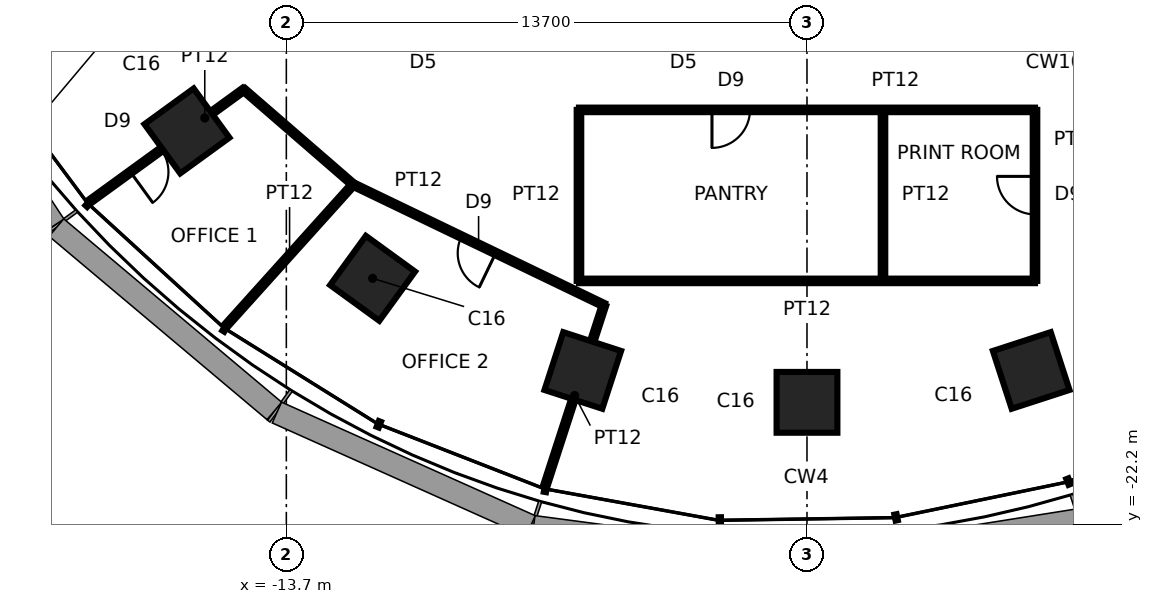
"""IFC4 building model, lengths in metres.
Left out: names, types, materials, properties, quantities, classifications, styles, units other than length and angle.
Written with IfcOpenShell. Run it as: python <this file> out.ifc"""

import sys

from ifc_helpers import new_model, si_unit, direction, frame, frame_2d, origin, origin_2d, place, context, subcontext, project, spatial, rectangle, extrude, element, fill, save


model = new_model("IFC4")
c1 = context("Model", 3, precision=1e-05, world=origin(), true_north=direction((0.0, 1.0)))
c2 = subcontext(c1, "Body", "Model", "MODEL_VIEW")
j1 = project(units=[si_unit("LENGTHUNIT", "METRE"), si_unit("PLANEANGLEUNIT", "RADIAN")], contexts=[c1])
p1 = place(None, origin())
s1 = spatial("IfcSite", under=j1, at=p1, CompositionType="ELEMENT")
p2 = place(p1, origin())
s2 = spatial("IfcBuilding", under=s1, at=p2, CompositionType="ELEMENT")
p3 = place(p2, frame((0.0, 0.0, 154.8)))
s3 = spatial("IfcBuildingStorey", under=s2, at=p3, CompositionType="ELEMENT", Elevation=154.8)
for number, where, z_axis, x_axis in (
    (1, (-16.315, -11.854, 0.0), (0.0, 0.0, 1.0), (-0.809, -0.588, 0.0)),
    (2, (-11.43, -15.733, 0.0), (0.0, 0.0, 1.0), (-0.588, -0.809, 0.0)),
    (3, (-5.9, -18.157, 0.0), (0.0, 0.0, 1.0), (-0.309, -0.951, 0.0)),
    (4, (0.0, -18.996, 0.0), (0.0, 0.0, 1.0), (0.0, -1.0, 0.0)),
    (5, (5.9, -18.157, 0.0), (0.0, 0.0, 1.0), (0.309, -0.951, 0.0)),
):
    element("IfcColumn", number, at=place(p3, frame(where, z_axis=z_axis, x_axis=x_axis)), inside=s3, PredefinedType="COLUMN", context=c2, shape_type="SweptSolid", body=[
        extrude(rectangle(XDim=1.6, YDim=1.6, at=origin_2d()), origin(), (0.0, 0.0, 1.0), 3.9),
    ])
p4 = place(p3, frame((-14.821, -10.768, 0.0), z_axis=(0.0, 0.0, 1.0), x_axis=(-0.809042143657, -0.587750635718, 0.0)))
e6 = element("IfcWall", 6, at=p4, inside=s3, PredefinedType="PARTITIONING", context=c2, shape_type="SweptSolid", body=[
    extrude(rectangle(XDim=5.0, YDim=0.12, at=frame_2d((2.5, 0.0))), origin(), (0.0, 0.0, 1.0), 2.94),
])
p5 = place(p4, frame((2.685, 0.0, 0.0)))
e7 = element("IfcOpeningElement", 7, at=p5, cuts=e6, PredefinedType="OPENING", context=c2, shape_type="SweptSolid", body=[
    extrude(rectangle(XDim=1.0, YDim=2.4, at=frame_2d((0.5, 1.2))), frame((0.0, 0.07, 0.0), z_axis=(0.0, -1.0, 0.0), x_axis=(1.0, 0.0, 0.0)), (0.0, 0.0, 1.0), 0.14),
])
p6 = place(p3, frame((-11.942, -13.263, 0.0), z_axis=(0.0, 0.0, 1.0), x_axis=(-0.755744060509, 0.654867097208, 0.0)))
e8 = element("IfcWall", 8, at=p6, inside=s3, PredefinedType="PARTITIONING", context=c2, shape_type="SweptSolid", body=[
    extrude(rectangle(XDim=3.809, YDim=0.12, at=frame_2d((1.905, 0.0))), origin(), (0.0, 0.0, 1.0), 3.74),
])
p7 = place(p3, frame((-11.942, -13.263, 0.0), z_axis=(0.0, 0.0, 1.0), x_axis=(-0.669126573551, -0.743148456614, 0.0)))
e9 = element("IfcWall", 9, at=p7, inside=s3, PredefinedType="PARTITIONING", context=c2, shape_type="SweptSolid", body=[
    extrude(rectangle(XDim=5.0, YDim=0.12, at=frame_2d((2.5, 0.0))), origin(), (0.0, 0.0, 1.0), 3.74),
])
p8 = place(p3, frame((-5.341, -16.439, 0.0), z_axis=(0.0, 0.0, 1.0), x_axis=(-0.901084159561, 0.43364425211, 0.0)))
e10 = element("IfcWall", 10, at=p8, inside=s3, PredefinedType="PARTITIONING", context=c2, shape_type="SweptSolid", body=[
    extrude(rectangle(XDim=7.325, YDim=0.12, at=frame_2d((3.663, 0.0))), origin(), (0.0, 0.0, 1.0), 3.74),
])
p9 = place(p8, frame((3.162, 0.0, 0.0)))
e11 = element("IfcOpeningElement", 11, at=p9, cuts=e10, PredefinedType="OPENING", context=c2, shape_type="SweptSolid", body=[
    extrude(rectangle(XDim=1.0, YDim=2.4, at=frame_2d((0.5, 1.2))), frame((0.0, 0.07, 0.0), z_axis=(0.0, -1.0, 0.0), x_axis=(1.0, 0.0, 0.0)), (0.0, 0.0, 1.0), 0.14),
])
p10 = place(p3, frame((-6.0, -15.8, 0.0), z_axis=(0.0, 0.0, 1.0), x_axis=(0.0, 1.0, 0.0)))
e12 = element("IfcWall", 12, at=p10, inside=s3, PredefinedType="PARTITIONING", context=c2, shape_type="SweptSolid", body=[
    extrude(rectangle(XDim=4.5, YDim=0.12, at=frame_2d((2.25, 0.0))), origin(), (0.0, 0.0, 1.0), 3.74),
])
p11 = place(p3, frame((-6.886, -21.194, 0.0), z_axis=(0.0, 0.0, 1.0), x_axis=(0.309040803421, 0.951048779938, 0.0)))
e13 = element("IfcWall", 13, at=p11, inside=s3, PredefinedType="PARTITIONING", context=c2, shape_type="SweptSolid", body=[
    extrude(rectangle(XDim=5.0, YDim=0.12, at=frame_2d((2.5, 0.0))), origin(), (0.0, 0.0, 1.0), 2.94),
])
p12 = place(p3, frame((-6.0, -11.3, 0.0), z_axis=(0.0, 0.0, 1.0), x_axis=(1.0, 0.0, 0.0)))
e14 = element("IfcWall", 14, at=p12, inside=s3, PredefinedType="PARTITIONING", context=c2, shape_type="SweptSolid", body=[
    extrude(rectangle(XDim=12.0, YDim=0.12, at=frame_2d((6.0, 0.0))), origin(), (0.0, 0.0, 1.0), 3.74),
])
p13 = place(p12, frame((3.5, 0.0, 0.0)))
e15 = element("IfcOpeningElement", 15, at=p13, cuts=e14, PredefinedType="OPENING", context=c2, shape_type="SweptSolid", body=[
    extrude(rectangle(XDim=1.0, YDim=2.4, at=frame_2d((0.5, 1.2))), frame((0.0, 0.07, 0.0), z_axis=(0.0, -1.0, 0.0), x_axis=(1.0, 0.0, 0.0)), (0.0, 0.0, 1.0), 0.14),
])
p14 = place(p3, frame((6.0, -15.8, 0.0), z_axis=(0.0, 0.0, 1.0), x_axis=(-1.0, 0.0, 0.0)))
e16 = element("IfcWall", 16, at=p14, inside=s3, PredefinedType="PARTITIONING", context=c2, shape_type="SweptSolid", body=[
    extrude(rectangle(XDim=12.0, YDim=0.12, at=frame_2d((6.0, 0.0))), origin(), (0.0, 0.0, 1.0), 3.286),
])
p15 = place(p3, frame((2.0, -11.3, 0.0), z_axis=(0.0, 0.0, 1.0), x_axis=(0.0, -1.0, 0.0)))
e17 = element("IfcWall", 17, at=p15, inside=s3, PredefinedType="PARTITIONING", context=c2, shape_type="SweptSolid", body=[
    extrude(rectangle(XDim=4.5, YDim=0.12, at=frame_2d((2.25, 0.0))), origin(), (0.0, 0.0, 1.0), 3.74),
])
p16 = place(p3, frame((6.0, -11.3, 0.0), z_axis=(0.0, 0.0, 1.0), x_axis=(0.0, -1.0, 0.0)))
e18 = element("IfcWall", 18, at=p16, inside=s3, PredefinedType="PARTITIONING", context=c2, shape_type="SweptSolid", body=[
    extrude(rectangle(XDim=4.5, YDim=0.12, at=frame_2d((2.25, 0.0))), origin(), (0.0, 0.0, 1.0), 3.74),
])
p17 = place(p16, frame((1.75, 0.0, 0.0)))
e19 = element("IfcOpeningElement", 19, at=p17, cuts=e18, PredefinedType="OPENING", context=c2, shape_type="SweptSolid", body=[
    extrude(rectangle(XDim=1.0, YDim=2.4, at=frame_2d((0.5, 1.2))), frame((0.0, 0.07, 0.0), z_axis=(0.0, -1.0, 0.0), x_axis=(1.0, 0.0, 0.0)), (0.0, 0.0, 1.0), 0.14),
])
p18 = place(p5, origin())
e20 = element("IfcDoor", 20, at=p18, inside=s3, OperationType="SINGLE_SWING_RIGHT", PredefinedType="DOOR", context=c2, shape_type="SweptSolid", body=[
    extrude(rectangle(XDim=1.0, YDim=2.4, at=frame_2d((0.5, 1.2))), frame((0.0, 0.025, 0.0), z_axis=(0.0, -1.0, 0.0), x_axis=(1.0, 0.0, 0.0)), (0.0, 0.0, 1.0), 0.05),
])
fill(e7, e20)
p19 = place(p9, origin())
e21 = element("IfcDoor", 21, at=p19, inside=s3, OperationType="SINGLE_SWING_LEFT", PredefinedType="DOOR", context=c2, shape_type="SweptSolid", body=[
    extrude(rectangle(XDim=1.0, YDim=2.4, at=frame_2d((0.5, 1.2))), frame((0.0, 0.025, 0.0), z_axis=(0.0, -1.0, 0.0), x_axis=(1.0, 0.0, 0.0)), (0.0, 0.0, 1.0), 0.05),
])
fill(e11, e21)
p20 = place(p13, frame((1.0, 0.0, 0.0), z_axis=(0.0, 0.0, 1.0), x_axis=(-1.0, 0.0, 0.0)))
e22 = element("IfcDoor", 22, at=p20, inside=s3, OperationType="SINGLE_SWING_RIGHT", PredefinedType="DOOR", context=c2, shape_type="SweptSolid", body=[
    extrude(rectangle(XDim=1.0, YDim=2.4, at=frame_2d((0.5, 1.2))), frame((0.0, 0.025, 0.0), z_axis=(0.0, -1.0, 0.0), x_axis=(1.0, 0.0, 0.0)), (0.0, 0.0, 1.0), 0.05),
])
fill(e15, e22)
p21 = place(p17, frame((1.0, 0.0, 0.0), z_axis=(0.0, 0.0, 1.0), x_axis=(-1.0, 0.0, 0.0)))
e23 = element("IfcDoor", 23, at=p21, inside=s3, OperationType="SINGLE_SWING_RIGHT", PredefinedType="DOOR", context=c2, shape_type="SweptSolid", body=[
    extrude(rectangle(XDim=1.0, YDim=2.4, at=frame_2d((0.5, 1.2))), frame((0.0, 0.025, 0.0), z_axis=(0.0, -1.0, 0.0), x_axis=(1.0, 0.0, 0.0)), (0.0, 0.0, 1.0), 0.05),
])
fill(e19, e23)
save(model, sys.argv[1])
